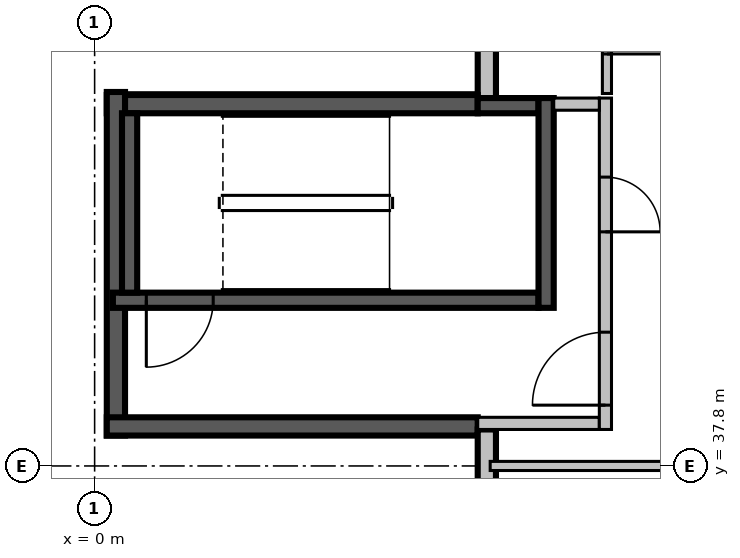
"""IFC4 building model, lengths in metres.
Left out: names, types, materials, properties, quantities, classifications, styles, units other than length and angle.
Written with IfcOpenShell. Run it as: python <this file> out.ifc"""

import sys

from ifc_helpers import new_model, si_unit, direction, frame, frame_2d, origin, place, context, subcontext, project, spatial, rectangle, extrude, source, transform, mapped, element, fill, save


model = new_model("IFC4")
c1 = context("Model", 3, precision=1e-05, world=origin(), true_north=direction((0.0, 1.0)))
c2 = subcontext(c1, "Body", "Model", "MODEL_VIEW")
j1 = project(units=[si_unit("LENGTHUNIT", "METRE"), si_unit("PLANEANGLEUNIT", "RADIAN")], contexts=[c1])
p1 = place(None, origin())
s1 = spatial("IfcSite", under=j1, at=p1, CompositionType="ELEMENT")
p2 = place(p1, origin())
s2 = spatial("IfcBuilding", under=s1, at=p2, CompositionType="ELEMENT")
p3 = place(p2, frame((0.0, 0.0, 158.1)))
s3 = spatial("IfcBuildingStorey", under=s2, at=p3, CompositionType="ELEMENT", Elevation=158.1)
m1 = source(origin(), c2, "Body", "SweptSolid", [
    extrude(rectangle(XDim=9.91, YDim=0.3, at=frame_2d((4.955, 0.0))), origin(), (0.0, 0.0, 1.0), 3.8),
])
p4 = place(p3, frame((6.45, 53.76, 0.0), z_axis=(0.0, 0.0, 1.0), x_axis=(0.0, -1.0, 0.0)))
e1 = element("IfcWall", 1, at=p4, inside=s3, PredefinedType="STANDARD", context=c2, shape_type="MappedRepresentation", body=[
    mapped(m1, transform((0.0, 0.0, 0.0), scale=1.0)),
])
m2 = source(origin(), c2, "Body", "SweptSolid", [
    extrude(rectangle(XDim=2.4, YDim=2.7, at=frame_2d((1.2, 1.35))), frame((0.0, 0.16, 0.0), z_axis=(0.0, -1.0, 0.0), x_axis=(1.0, 0.0, 0.0)), (0.0, 0.0, 1.0), 0.32),
])
p5 = place(p4, frame((4.272, 0.0, 0.6)))
e2 = element("IfcOpeningElement", 2, at=p5, cuts=e1, PredefinedType="OPENING", context=c2, shape_type="MappedRepresentation", body=[
    mapped(m2, transform((0.0, 0.0, 0.0), scale=1.0)),
])
p6 = place(p4, frame((0.936, 0.0, 0.6)))
e3 = element("IfcOpeningElement", 3, at=p6, cuts=e1, PredefinedType="OPENING", context=c2, shape_type="MappedRepresentation", body=[
    mapped(m2, transform((0.0, 0.0, 0.0), scale=1.0)),
])
m3 = source(origin(), c2, "Body", "SweptSolid", [
    extrude(rectangle(XDim=6.1, YDim=0.3, at=frame_2d((3.05, 0.0))), origin(), (0.0, 0.0, 1.0), 3.8),
])
p7 = place(p3, frame((6.3, 43.75, 0.0), z_axis=(0.0, 0.0, 1.0), x_axis=(-1.0, 0.0, 0.0)))
e4 = element("IfcWall", 4, at=p7, inside=s3, PredefinedType="SOLIDWALL", context=c2, shape_type="MappedRepresentation", body=[
    mapped(m3, transform((0.0, 0.0, 0.0), scale=1.0)),
])
m4 = source(origin(), c2, "Body", "SweptSolid", [
    extrude(rectangle(XDim=5.65, YDim=0.3, at=frame_2d((2.825, 0.0))), origin(), (0.0, 0.0, 1.0), 3.8),
])
p8 = place(p3, frame((0.35, 43.95, 0.0), z_axis=(0.0, 0.0, 1.0), x_axis=(0.0, -1.0, 0.0)))
e5 = element("IfcWall", 5, at=p8, inside=s3, PredefinedType="SOLIDWALL", context=c2, shape_type="MappedRepresentation", body=[
    mapped(m4, transform((0.0, 0.0, 0.0), scale=1.0)),
])
p9 = place(p3, frame((0.2, 38.45, 0.0), z_axis=(0.0, 0.0, 1.0), x_axis=(1.0, 0.0, 0.0)))
e6 = element("IfcWall", 6, at=p9, inside=s3, PredefinedType="SOLIDWALL", context=c2, shape_type="MappedRepresentation", body=[
    mapped(m3, transform((0.0, 0.0, 0.0), scale=1.0)),
])
m5 = source(origin(), c2, "Body", "SweptSolid", [
    extrude(rectangle(XDim=16.4, YDim=0.3, at=frame_2d((8.2, 0.0))), origin(), (0.0, 0.0, 1.0), 3.8),
])
p10 = place(p3, frame((6.45, 38.4, 0.0), z_axis=(0.0, 0.0, 1.0), x_axis=(0.0, -1.0, 0.0)))
e7 = element("IfcWall", 7, at=p10, inside=s3, PredefinedType="STANDARD", context=c2, shape_type="MappedRepresentation", body=[
    mapped(m5, transform((0.0, 0.0, 0.0), scale=1.0)),
])
m6 = source(origin(), c2, "Body", "SweptSolid", [
    extrude(rectangle(XDim=1.8, YDim=2.7, at=frame_2d((0.9, 1.35))), frame((0.0, 0.16, 0.0), z_axis=(0.0, -1.0, 0.0), x_axis=(1.0, 0.0, 0.0)), (0.0, 0.0, 1.0), 0.32),
])
p11 = place(p10, frame((1.15, 0.0, 0.6)))
e8 = element("IfcOpeningElement", 8, at=p11, cuts=e7, PredefinedType="OPENING", context=c2, shape_type="MappedRepresentation", body=[
    mapped(m6, transform((0.0, 0.0, 0.0), scale=1.0)),
])
p12 = place(p10, frame((5.162, 0.0, 0.6)))
e9 = element("IfcOpeningElement", 9, at=p12, cuts=e7, PredefinedType="OPENING", context=c2, shape_type="MappedRepresentation", body=[
    mapped(m6, transform((0.0, 0.0, 0.0), scale=1.0)),
])
p13 = place(p10, frame((9.438, 0.0, 0.6)))
e10 = element("IfcOpeningElement", 10, at=p13, cuts=e7, PredefinedType="OPENING", context=c2, shape_type="MappedRepresentation", body=[
    mapped(m6, transform((0.0, 0.0, 0.0), scale=1.0)),
])
m7 = source(origin(), c2, "Body", "SweptSolid", [
    extrude(rectangle(XDim=1.2, YDim=2.7, at=frame_2d((0.6, 1.35))), frame((0.0, 0.16, 0.0), z_axis=(0.0, -1.0, 0.0), x_axis=(1.0, 0.0, 0.0)), (0.0, 0.0, 1.0), 0.32),
])
p14 = place(p10, frame((12.912, 0.0, 0.6)))
e11 = element("IfcOpeningElement", 11, at=p14, cuts=e7, PredefinedType="OPENING", context=c2, shape_type="MappedRepresentation", body=[
    mapped(m7, transform((0.0, 0.0, 0.0), scale=1.0)),
])
m8 = source(origin(), c2, "Body", "SweptSolid", [
    extrude(rectangle(XDim=7.0, YDim=0.25, at=frame_2d((3.5, 0.0))), origin(), (0.0, 0.0, 1.0), 3.8),
])
p15 = place(p3, frame((0.3, 40.525, 0.0), z_axis=(0.0, 0.0, 1.0), x_axis=(1.0, 0.0, 0.0)))
e12 = element("IfcWall", 12, at=p15, inside=s3, PredefinedType="SOLIDWALL", context=c2, shape_type="MappedRepresentation", body=[
    mapped(m8, transform((0.0, 0.0, 0.0), scale=1.0)),
])
m9 = source(origin(), c2, "Body", "SweptSolid", [
    extrude(rectangle(XDim=1.1, YDim=2.1, at=frame_2d((0.55, 1.05))), frame((0.0, 0.135, 0.0), z_axis=(0.0, -1.0, 0.0), x_axis=(1.0, 0.0, 0.0)), (0.0, 0.0, 1.0), 0.27),
])
p16 = place(p15, frame((0.55, 0.0, 0.0)))
e13 = element("IfcOpeningElement", 13, at=p16, cuts=e12, PredefinedType="OPENING", context=c2, shape_type="MappedRepresentation", body=[
    mapped(m9, transform((0.0, 0.0, 0.0), scale=1.0)),
])
m10 = source(origin(), c2, "Body", "SweptSolid", [
    extrude(rectangle(XDim=1.0, YDim=0.25, at=frame_2d((0.5, 0.0))), origin(), (0.0, 0.0, 1.0), 3.8),
])
p17 = place(p3, frame((6.3, 43.725, 0.0), z_axis=(0.0, 0.0, 1.0), x_axis=(1.0, 0.0, 0.0)))
e14 = element("IfcWall", 14, at=p17, inside=s3, PredefinedType="SOLIDWALL", context=c2, shape_type="MappedRepresentation", body=[
    mapped(m10, transform((0.0, 0.0, 0.0), scale=1.0)),
])
m11 = source(origin(), c2, "Body", "SweptSolid", [
    extrude(rectangle(XDim=3.45, YDim=0.25, at=frame_2d((1.725, 0.0))), origin(), (0.0, 0.0, 1.0), 3.8),
])
p18 = place(p3, frame((7.425, 40.4, 0.0), z_axis=(0.0, 0.0, 1.0), x_axis=(0.0, 1.0, 0.0)))
e15 = element("IfcWall", 15, at=p18, inside=s3, PredefinedType="SOLIDWALL", context=c2, shape_type="MappedRepresentation", body=[
    mapped(m11, transform((0.0, 0.0, 0.0), scale=1.0)),
])
m12 = source(origin(), c2, "Body", "SweptSolid", [
    extrude(rectangle(XDim=2.95, YDim=0.25, at=frame_2d((1.475, 0.0))), origin(), (0.0, 0.0, 1.0), 3.8),
])
p19 = place(p3, frame((0.575, 40.65, 0.0), z_axis=(0.0, 0.0, 1.0), x_axis=(0.0, 1.0, 0.0)))
e16 = element("IfcWall", 16, at=p19, inside=s3, PredefinedType="SOLIDWALL", context=c2, shape_type="MappedRepresentation", body=[
    mapped(m12, transform((0.0, 0.0, 0.0), scale=1.0)),
])
m13 = source(origin(), c2, "Body", "SweptSolid", [
    extrude(rectangle(XDim=2.0, YDim=0.2, at=frame_2d((1.0, 0.0))), origin(), (0.0, 0.0, 1.0), 3.8),
])
p20 = place(p3, frame((6.3, 38.5, 0.0), z_axis=(0.0, 0.0, 1.0), x_axis=(1.0, 0.0, 0.0)))
e17 = element("IfcWall", 17, at=p20, inside=s3, PredefinedType="PARTITIONING", context=c2, shape_type="MappedRepresentation", body=[
    mapped(m13, transform((0.0, 0.0, 0.0), scale=1.0)),
])
m14 = source(origin(), c2, "Body", "SweptSolid", [
    extrude(rectangle(XDim=5.45, YDim=0.2, at=frame_2d((2.725, 0.0))), origin(), (0.0, 0.0, 1.0), 3.8),
])
p21 = place(p3, frame((8.4, 38.4, 0.0), z_axis=(0.0, 0.0, 1.0), x_axis=(0.0, 1.0, 0.0)))
e18 = element("IfcWall", 18, at=p21, inside=s3, PredefinedType="PARTITIONING", context=c2, shape_type="MappedRepresentation", body=[
    mapped(m14, transform((0.0, 0.0, 0.0), scale=1.0)),
])
m15 = source(origin(), c2, "Body", "SweptSolid", [
    extrude(rectangle(XDim=1.2, YDim=2.1, at=frame_2d((0.6, 1.05))), frame((0.0, 0.11, 0.0), z_axis=(0.0, -1.0, 0.0), x_axis=(1.0, 0.0, 0.0)), (0.0, 0.0, 1.0), 0.22),
])
p22 = place(p21, frame((0.4, 0.0, 0.0)))
e19 = element("IfcOpeningElement", 19, at=p22, cuts=e18, PredefinedType="OPENING", context=c2, shape_type="MappedRepresentation", body=[
    mapped(m15, transform((0.0, 0.0, 0.0), scale=1.0)),
])
m16 = source(origin(), c2, "Body", "SweptSolid", [
    extrude(rectangle(XDim=0.9, YDim=2.1, at=frame_2d((0.45, 1.05))), frame((0.0, 0.11, 0.0), z_axis=(0.0, -1.0, 0.0), x_axis=(1.0, 0.0, 0.0)), (0.0, 0.0, 1.0), 0.22),
])
p23 = place(p21, frame((3.25, 0.0, 0.0)))
e20 = element("IfcOpeningElement", 20, at=p23, cuts=e18, PredefinedType="OPENING", context=c2, shape_type="MappedRepresentation", body=[
    mapped(m16, transform((0.0, 0.0, 0.0), scale=1.0)),
])
m17 = source(origin(), c2, "Body", "SweptSolid", [
    extrude(rectangle(XDim=0.75, YDim=0.2, at=frame_2d((0.375, 0.0))), origin(), (0.0, 0.0, 1.0), 3.8),
])
p24 = place(p3, frame((7.55, 43.75, 0.0), z_axis=(0.0, 0.0, 1.0), x_axis=(1.0, 0.0, 0.0)))
e21 = element("IfcWall", 21, at=p24, inside=s3, PredefinedType="PARTITIONING", context=c2, shape_type="MappedRepresentation", body=[
    mapped(m17, transform((0.0, 0.0, 0.0), scale=1.0)),
])
m18 = source(origin(), c2, "Body", "SweptSolid", [
    extrude(rectangle(XDim=2.2, YDim=0.15, at=frame_2d((1.1, 0.0))), origin(), (0.0, 0.0, 1.0), 3.8),
])
p25 = place(p3, frame((8.425, 43.925, 0.0), z_axis=(0.0, 0.0, 1.0), x_axis=(0.0, 1.0, 0.0)))
e22 = element("IfcWall", 22, at=p25, inside=s3, PredefinedType="PARTITIONING", context=c2, shape_type="MappedRepresentation", body=[
    mapped(m18, transform((0.0, 0.0, 0.0), scale=1.0)),
])
m19 = source(origin(), c2, "Body", "SweptSolid", [
    extrude(rectangle(XDim=0.9, YDim=2.1, at=frame_2d((0.45, 1.05))), frame((0.0, 0.085, 0.0), z_axis=(0.0, -1.0, 0.0), x_axis=(1.0, 0.0, 0.0)), (0.0, 0.0, 1.0), 0.17),
])
p26 = place(p25, frame((0.65, 0.0, 0.0)))
e23 = element("IfcOpeningElement", 23, at=p26, cuts=e22, PredefinedType="OPENING", context=c2, shape_type="MappedRepresentation", body=[
    mapped(m19, transform((0.0, 0.0, 0.0), scale=1.0)),
])
m20 = source(origin(), c2, "Body", "SweptSolid", [
    extrude(rectangle(XDim=3.471, YDim=0.15, at=frame_2d((1.736, 0.0))), origin(), (0.0, 0.0, 1.0), 3.8),
])
p27 = place(p3, frame((9.976, 37.8, 0.0), z_axis=(0.0, 0.0, 1.0), x_axis=(-1.0, 0.0, 0.0)))
e24 = element("IfcWall", 24, at=p27, inside=s3, PredefinedType="PARTITIONING", context=c2, shape_type="MappedRepresentation", body=[
    mapped(m20, transform((0.0, 0.0, 0.0), scale=1.0)),
])
m21 = source(origin(), c2, "Body", "SweptSolid", [
    extrude(rectangle(XDim=1.1, YDim=2.1, at=frame_2d((0.55, 1.05))), frame((0.0, 0.025, 0.0), z_axis=(0.0, -1.0, 0.0), x_axis=(1.0, 0.0, 0.0)), (0.0, 0.0, 1.0), 0.05),
])
p28 = place(p16, origin())
e25 = element("IfcDoor", 25, at=p28, inside=s3, OperationType="SINGLE_SWING_RIGHT", PredefinedType="DOOR", context=c2, shape_type="MappedRepresentation", body=[
    mapped(m21, transform((0.0, 0.0, 0.0), scale=1.0)),
])
fill(e13, e25)
m22 = source(origin(), c2, "Body", "SweptSolid", [
    extrude(rectangle(XDim=1.2, YDim=2.1, at=frame_2d((0.6, 1.05))), frame((0.0, 0.025, 0.0), z_axis=(0.0, -1.0, 0.0), x_axis=(1.0, 0.0, 0.0)), (0.0, 0.0, 1.0), 0.05),
])
p29 = place(p22, origin())
e26 = element("IfcDoor", 26, at=p29, inside=s3, OperationType="SINGLE_SWING_LEFT", PredefinedType="DOOR", context=c2, shape_type="MappedRepresentation", body=[
    mapped(m22, transform((0.0, 0.0, 0.0), scale=1.0)),
])
fill(e19, e26)
m23 = source(origin(), c2, "Body", "SweptSolid", [
    extrude(rectangle(XDim=0.9, YDim=2.1, at=frame_2d((0.45, 1.05))), frame((0.0, 0.025, 0.0), z_axis=(0.0, -1.0, 0.0), x_axis=(1.0, 0.0, 0.0)), (0.0, 0.0, 1.0), 0.05),
])
p30 = place(p23, origin())
e27 = element("IfcDoor", 27, at=p30, inside=s3, OperationType="SINGLE_SWING_RIGHT", PredefinedType="DOOR", context=c2, shape_type="MappedRepresentation", body=[
    mapped(m23, transform((0.0, 0.0, 0.0), scale=1.0)),
])
fill(e20, e27)
p31 = place(p26, origin())
e28 = element("IfcDoor", 28, at=p31, inside=s3, OperationType="SINGLE_SWING_RIGHT", PredefinedType="DOOR", context=c2, shape_type="MappedRepresentation", body=[
    mapped(m23, transform((0.0, 0.0, 0.0), scale=1.0)),
])
fill(e23, e28)
save(model, sys.argv[1])
